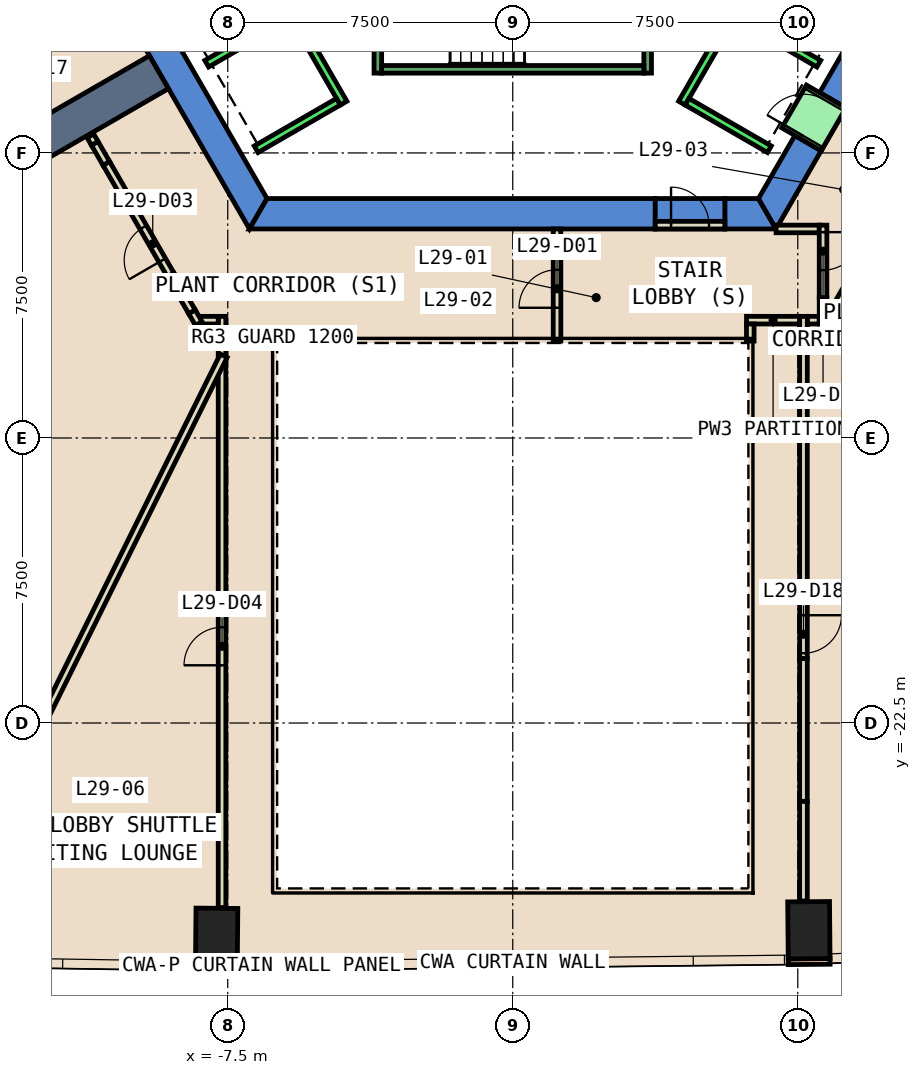
"""IFC4 building model, lengths in metres.
Left out: names, types, materials, properties, quantities, classifications, styles, units other than length and angle.
Written with IfcOpenShell. Run it as: python <this file> out.ifc"""

import sys

from ifc_helpers import new_model, si_unit, direction, frame, frame_2d, origin, origin_2d, place, context, subcontext, project, spatial, polyline, rectangle, outline, extrude, element, fill, save


model = new_model("IFC4")
c1 = context("Model", 3, precision=1e-05, world=origin(), true_north=direction((0.0, 1.0)))
c2 = subcontext(c1, "Body", "Model", "MODEL_VIEW")
j1 = project(units=[si_unit("LENGTHUNIT", "METRE"), si_unit("PLANEANGLEUNIT", "RADIAN")], contexts=[c1])
p1 = place(None, origin())
s1 = spatial("IfcSite", under=j1, at=p1, CompositionType="ELEMENT")
p2 = place(p1, origin())
s2 = spatial("IfcBuilding", under=s1, at=p2, CompositionType="ELEMENT")
p3 = place(p2, frame((0.0, 0.0, 132.8)))
s3 = spatial("IfcBuildingStorey", under=s2, at=p3, CompositionType="ELEMENT", Elevation=132.8)
for number, where, z_axis, x_axis in (
    (1, (-7.792, -28.125, -0.6), (0.0, 0.0, 1.0), (-1.0, 0.009, 0.0)),
    (2, (7.792, -27.952, -0.6), (0.0, 0.0, 1.0), (1.0, 0.009, 0.0)),
):
    element("IfcColumn", number, at=place(p3, frame(where, z_axis=z_axis, x_axis=x_axis)), inside=s3, PredefinedType="COLUMN", context=c2, shape_type="SweptSolid", body=[
        extrude(rectangle(XDim=1.1, YDim=1.5, at=origin_2d()), origin(), (0.0, 0.0, 1.0), 5.4),
    ])
p4 = place(p3, frame((0.0, 0.0, -0.6)))
e3 = element("IfcWall", 3, at=p4, inside=s3, PredefinedType="SHEAR", context=c2, shape_type="SweptSolid", body=[
    extrude(outline(polyline([(-13.856, 2.5), (-6.928, -9.5), (-6.466, -8.7), (-12.933, 2.5), (-13.856, 2.5)])), origin(), (0.0, 0.0, 1.0), 5.4),
])
p5 = place(p3, frame((0.0, 0.0, -0.6)))
e4 = element("IfcWall", 4, at=p5, inside=s3, PredefinedType="SHEAR", context=c2, shape_type="SweptSolid", body=[
    extrude(outline(polyline([(3.75, -9.5), (3.75, -8.7), (-6.466, -8.7), (-6.928, -9.5), (3.75, -9.5)])), origin(), (0.0, 0.0, 1.0), 5.4),
])
p6 = place(p3, frame((0.0, 0.0, -0.6)))
e5 = element("IfcWall", 5, at=p6, inside=s3, PredefinedType="SHEAR", context=c2, shape_type="SweptSolid", body=[
    extrude(outline(polyline([(5.58, -8.7), (5.58, -9.5), (6.928, -9.5), (6.466, -8.7), (5.58, -8.7)])), origin(), (0.0, 0.0, 1.0), 5.4),
])
p7 = place(p3, frame((0.0, 0.0, 3.6)))
e6 = element("IfcWall", 6, at=p7, inside=s3, PredefinedType="SHEAR", context=c2, shape_type="SweptSolid", body=[
    extrude(outline(polyline([(5.58, -9.5), (5.58, -8.7), (3.75, -8.7), (3.75, -9.5), (5.58, -9.5)])), origin(), (0.0, 0.0, 1.0), 1.2),
])
p8 = place(p3, frame((0.0, 0.0, -0.6)))
e7 = element("IfcWall", 7, at=p8, inside=s3, PredefinedType="SHEAR", context=c2, shape_type="SweptSolid", body=[
    extrude(outline(polyline([(8.117, -7.44), (7.424, -7.04), (6.466, -8.7), (6.928, -9.5), (8.117, -7.44)])), origin(), (0.0, 0.0, 1.0), 5.4),
])
p9 = place(p3, frame((0.0, 0.0, -0.6)))
e8 = element("IfcWall", 8, at=p9, inside=s3, PredefinedType="SHEAR", context=c2, shape_type="SweptSolid", body=[
    extrude(outline(polyline([(9.417, -5.189), (8.724, -4.789), (8.075, -5.914), (8.767, -6.314), (9.417, -5.189)])), origin(), (0.0, 0.0, 1.0), 5.4),
])
p10 = place(p3, frame((0.0, 0.0, 3.6)))
e9 = element("IfcWall", 9, at=p10, inside=s3, PredefinedType="SHEAR", context=c2, shape_type="SweptSolid", body=[
    extrude(outline(polyline([(8.767, -6.314), (8.075, -5.914), (7.424, -7.04), (8.117, -7.44), (8.767, -6.314)])), origin(), (0.0, 0.0, 1.0), 1.2),
])
p11 = place(p3, frame((-9.31, -5.375, 0.0), z_axis=(0.0, 0.0, 1.0), x_axis=(-0.86602173752, -0.500006350103, 0.0)))
e10 = element("IfcWall", 10, at=p11, inside=s3, PredefinedType="SHEAR", context=c2, shape_type="SweptSolid", body=[
    extrude(rectangle(XDim=31.463, YDim=1.0, at=frame_2d((15.732, 0.0))), origin(), (0.0, 0.0, 1.0), 4.8),
])
for number, where, z_axis, x_axis in (
    (11, (-8.349, -28.945, 0.0), (0.0, 0.0, 1.0), (1.0, -0.009, 0.0)),
    (12, (7.249, -28.782, 0.0), (0.0, 0.0, 1.0), (1.0, 0.009, 0.0)),
):
    element("IfcWall", number, at=place(p3, frame(where, z_axis=z_axis, x_axis=x_axis)), inside=s3, PredefinedType="STANDARD", context=c2, shape_type="SweptSolid", body=[
        extrude(rectangle(XDim=1.1, YDim=0.15, at=frame_2d((0.55, 0.0))), origin(), (0.0, 0.0, 1.0), 4.8),
    ])
p12 = place(p3, frame((1.165, -12.45, 0.0), z_axis=(0.0, 0.0, 1.0), x_axis=(0.0, 1.0, 0.0)))
e13 = element("IfcWall", 13, at=p12, inside=s3, PredefinedType="PARTITIONING", context=c2, shape_type="SweptSolid", body=[
    extrude(rectangle(XDim=2.95, YDim=0.2, at=frame_2d((1.475, 0.0))), origin(), (0.0, 0.0, 1.0), 4.8),
])
p13 = place(p12, frame((0.876, 0.0, 0.0)))
e14 = element("IfcOpeningElement", 14, at=p13, cuts=e13, PredefinedType="OPENING", context=c2, shape_type="SweptSolid", body=[
    extrude(rectangle(XDim=1.0, YDim=2.1, at=frame_2d((0.5, 1.05))), frame((0.0, 0.11, 0.0), z_axis=(0.0, -1.0, 0.0), x_axis=(1.0, 0.0, 0.0)), (0.0, 0.0, 1.0), 0.22),
])
p14 = place(p3, frame((7.55, -11.9, 0.0), z_axis=(0.0, 0.0, 1.0), x_axis=(-1.0, 0.0, 0.0)))
e15 = element("IfcWall", 15, at=p14, inside=s3, PredefinedType="PARTITIONING", context=c2, shape_type="SweptSolid", body=[
    extrude(rectangle(XDim=1.399, YDim=0.2, at=frame_2d((0.7, 0.0))), origin(), (0.0, 0.0, 1.0), 4.8),
])
p15 = place(p3, frame((6.25, -12.0, 0.0), z_axis=(0.0, 0.0, 1.0), x_axis=(0.0, -1.0, 0.0)))
e16 = element("IfcWall", 16, at=p15, inside=s3, PredefinedType="PARTITIONING", context=c2, shape_type="SweptSolid", body=[
    extrude(rectangle(XDim=0.45, YDim=0.2, at=frame_2d((0.225, 0.0))), origin(), (0.0, 0.0, 1.0), 4.8),
])
p16 = place(p3, frame((6.928, -9.5, 0.0), z_axis=(0.0, 0.0, 1.0), x_axis=(1.0, 0.0, 0.0)))
e17 = element("IfcWall", 17, at=p16, inside=s3, PredefinedType="PARTITIONING", context=c2, shape_type="SweptSolid", body=[
    extrude(rectangle(XDim=1.137, YDim=0.2, at=frame_2d((0.568, 0.0))), origin(), (0.0, 0.0, 1.0), 2.4),
])
p17 = place(p3, frame((8.165, -9.4, 0.0), z_axis=(0.0, 0.0, 1.0), x_axis=(0.0, -1.0, 0.0)))
e18 = element("IfcWall", 18, at=p17, inside=s3, PredefinedType="PARTITIONING", context=c2, shape_type="SweptSolid", body=[
    extrude(rectangle(XDim=1.914, YDim=0.2, at=frame_2d((0.957, 0.0))), origin(), (0.0, 0.0, 1.0), 2.4),
])
p18 = place(p17, frame((0.184, 0.0, 0.0)))
e19 = element("IfcOpeningElement", 19, at=p18, cuts=e18, PredefinedType="OPENING", context=c2, shape_type="SweptSolid", body=[
    extrude(rectangle(XDim=1.0, YDim=2.1, at=frame_2d((0.5, 1.05))), frame((0.0, 0.11, 0.0), z_axis=(0.0, -1.0, 0.0), x_axis=(1.0, 0.0, 0.0)), (0.0, 0.0, 1.0), 0.22),
])
p19 = place(p3, frame((8.065, -11.9, 0.0), z_axis=(0.0, 0.0, 1.0), x_axis=(-1.0, 0.0, 0.0)))
e20 = element("IfcWall", 20, at=p19, inside=s3, PredefinedType="PARTITIONING", context=c2, shape_type="SweptSolid", body=[
    extrude(rectangle(XDim=0.315, YDim=0.2, at=frame_2d((0.157, 0.0))), origin(), (0.0, 0.0, 1.0), 4.8),
])
p20 = place(p3, frame((7.65, -11.8, 0.0), z_axis=(0.0, 0.0, 1.0), x_axis=(0.0, -1.0, 0.0)))
e21 = element("IfcWall", 21, at=p20, inside=s3, PredefinedType="PARTITIONING", context=c2, shape_type="SweptSolid", body=[
    extrude(rectangle(XDim=9.006, YDim=0.2, at=frame_2d((4.503, 0.0))), origin(), (0.0, 0.0, 1.0), 4.8),
])
p21 = place(p20, frame((7.864, 0.0, 0.0)))
e22 = element("IfcOpeningElement", 22, at=p21, cuts=e21, PredefinedType="OPENING", context=c2, shape_type="SweptSolid", body=[
    extrude(rectangle(XDim=1.0, YDim=2.1, at=frame_2d((0.5, 1.05))), frame((0.0, 0.11, 0.0), z_axis=(0.0, -1.0, 0.0), x_axis=(1.0, 0.0, 0.0)), (0.0, 0.0, 1.0), 0.22),
])
p22 = place(p3, frame((-7.65, -12.826, 0.0), z_axis=(0.0, 0.0, 1.0), x_axis=(0.0, 1.0, 0.0)))
e23 = element("IfcWall", 23, at=p22, inside=s3, PredefinedType="PARTITIONING", context=c2, shape_type="SweptSolid", body=[
    extrude(rectangle(XDim=1.026, YDim=0.2, at=frame_2d((0.513, 0.0))), origin(), (0.0, 0.0, 1.0), 4.8),
])
p23 = place(p3, frame((-7.75, -11.9, 0.0), z_axis=(0.0, 0.0, 1.0), x_axis=(-1.0, 0.0, 0.0)))
e24 = element("IfcWall", 24, at=p23, inside=s3, PredefinedType="PARTITIONING", context=c2, shape_type="SweptSolid", body=[
    extrude(rectangle(XDim=0.464, YDim=0.2, at=frame_2d((0.232, 0.0))), origin(), (0.0, 0.0, 1.0), 4.8),
])
p24 = place(p3, frame((-8.264, -11.987, 0.0), z_axis=(0.0, 0.0, 1.0), x_axis=(-0.499011179969, 0.866595547107, 0.0)))
e25 = element("IfcWall", 25, at=p24, inside=s3, PredefinedType="PARTITIONING", context=c2, shape_type="SweptSolid", body=[
    extrude(rectangle(XDim=0.357, YDim=0.2, at=frame_2d((0.178, 0.0))), origin(), (0.0, 0.0, 1.0), 4.8),
])
p25 = place(p3, frame((-7.65, -27.356, 0.0), z_axis=(0.0, 0.0, 1.0), x_axis=(0.0, 1.0, 0.0)))
e26 = element("IfcWall", 26, at=p25, inside=s3, PredefinedType="PARTITIONING", context=c2, shape_type="SweptSolid", body=[
    extrude(rectangle(XDim=14.33, YDim=0.2, at=frame_2d((7.165, 0.0))), origin(), (0.0, 0.0, 1.0), 4.8),
])
p26 = place(p25, frame((6.375, 0.0, 0.0)))
e27 = element("IfcOpeningElement", 27, at=p26, cuts=e26, PredefinedType="OPENING", context=c2, shape_type="SweptSolid", body=[
    extrude(rectangle(XDim=1.0, YDim=2.1, at=frame_2d((0.5, 1.05))), frame((0.0, 0.11, 0.0), z_axis=(0.0, -1.0, 0.0), x_axis=(1.0, 0.0, 0.0)), (0.0, 0.0, 1.0), 0.22),
])
p27 = place(p3, frame((-7.606, -12.836, 0.0), z_axis=(0.0, 0.0, 1.0), x_axis=(-0.444253710324, -0.895901021801, 0.0)))
e28 = element("IfcWall", 28, at=p27, inside=s3, PredefinedType="PARTITIONING", context=c2, shape_type="SweptSolid", body=[
    extrude(rectangle(XDim=16.081, YDim=0.2, at=frame_2d((8.041, 0.0))), origin(), (0.0, 0.0, 1.0), 4.8),
])
p28 = place(p3, frame((-39.358, -20.223, 0.0), z_axis=(0.0, 0.0, 1.0), x_axis=(0.866032184561, 0.499988255166, 0.0)))
e29 = element("IfcWall", 29, at=p28, inside=s3, PredefinedType="PARTITIONING", context=c2, shape_type="SweptSolid", body=[
    extrude(rectangle(XDim=33.447, YDim=0.2, at=frame_2d((16.723, 0.0))), origin(), (0.0, 0.0, 1.0), 4.8),
])
p29 = place(p3, frame((3.75, -9.4, 0.0), z_axis=(0.0, 0.0, 1.0), x_axis=(1.0, 0.0, 0.0)))
e30 = element("IfcWall", 30, at=p29, inside=s3, PredefinedType="PARTITIONING", context=c2, shape_type="SweptSolid", body=[
    extrude(rectangle(XDim=1.83, YDim=0.2, at=frame_2d((0.915, 0.0))), origin(), (0.0, 0.0, 1.0), 2.4),
])
p30 = place(p29, frame((0.415, 0.0, 0.0)))
e31 = element("IfcOpeningElement", 31, at=p30, cuts=e30, PredefinedType="OPENING", context=c2, shape_type="SweptSolid", body=[
    extrude(rectangle(XDim=1.0, YDim=2.1, at=frame_2d((0.5, 1.05))), frame((0.0, 0.11, 0.0), z_axis=(0.0, -1.0, 0.0), x_axis=(1.0, 0.0, 0.0)), (0.0, 0.0, 1.0), 0.22),
])
p31 = place(p3, frame((8.165, -11.314, 0.0), z_axis=(0.0, 0.0, 1.0), x_axis=(0.0, -1.0, 0.0)))
e32 = element("IfcWall", 32, at=p31, inside=s3, PredefinedType="PARTITIONING", context=c2, shape_type="SweptSolid", body=[
    extrude(rectangle(XDim=0.686, YDim=0.2, at=frame_2d((0.343, 0.0))), origin(), (0.0, 0.0, 1.0), 4.8),
])
p32 = place(p3, frame((7.65, -20.806, 0.0), z_axis=(0.0, 0.0, 1.0), x_axis=(0.0, -1.0, 0.0)))
e33 = element("IfcWall", 33, at=p32, inside=s3, PredefinedType="PARTITIONING", context=c2, shape_type="SweptSolid", body=[
    extrude(rectangle(XDim=3.755, YDim=0.2, at=frame_2d((1.877, 0.0))), origin(), (0.0, 0.0, 1.0), 2.4),
])
p33 = place(p3, frame((7.65, -24.561, 0.0), z_axis=(0.0, 0.0, 1.0), x_axis=(0.0, -1.0, 0.0)))
e34 = element("IfcWall", 34, at=p33, inside=s3, PredefinedType="PARTITIONING", context=c2, shape_type="SweptSolid", body=[
    extrude(rectangle(XDim=2.622, YDim=0.2, at=frame_2d((1.311, 0.0))), origin(), (0.0, 0.0, 1.0), 4.8),
])
p34 = place(p3, frame((-8.442, -11.678, 0.0), z_axis=(0.0, 0.0, 1.0), x_axis=(-0.500408426468, 0.865789470206, 0.0)))
e35 = element("IfcWall", 35, at=p34, inside=s3, PredefinedType="PARTITIONING", context=c2, shape_type="SweptSolid", body=[
    extrude(rectangle(XDim=1.119, YDim=0.2, at=frame_2d((0.56, 0.0))), origin(), (0.0, 0.0, 1.0), 2.4),
])
p35 = place(p3, frame((-9.002, -10.709, 0.0), z_axis=(0.0, 0.0, 1.0), x_axis=(-0.499654870059, 0.866224572975, 0.0)))
e36 = element("IfcWall", 36, at=p35, inside=s3, PredefinedType="PARTITIONING", context=c2, shape_type="SweptSolid", body=[
    extrude(rectangle(XDim=2.398, YDim=0.2, at=frame_2d((1.199, 0.0))), origin(), (0.0, 0.0, 1.0), 4.8),
])
p36 = place(p35, frame((0.444, 0.0, 0.0)))
e37 = element("IfcOpeningElement", 37, at=p36, cuts=e36, PredefinedType="OPENING", context=c2, shape_type="SweptSolid", body=[
    extrude(rectangle(XDim=1.0, YDim=2.1, at=frame_2d((0.5, 1.05))), frame((0.0, 0.11, 0.0), z_axis=(0.0, -1.0, 0.0), x_axis=(1.0, 0.0, 0.0)), (0.0, 0.0, 1.0), 0.22),
])
p37 = place(p3, frame((-10.2, -8.632, 0.0), z_axis=(0.0, 0.0, 1.0), x_axis=(-0.500482758314, 0.865746503678, 0.0)))
e38 = element("IfcWall", 38, at=p37, inside=s3, PredefinedType="PARTITIONING", context=c2, shape_type="SweptSolid", body=[
    extrude(rectangle(XDim=0.991, YDim=0.2, at=frame_2d((0.496, 0.0))), origin(), (0.0, 0.0, 1.0), 2.3),
])
p38 = place(p3, frame((-10.696, -7.774, 0.0), z_axis=(0.0, 0.0, 1.0), x_axis=(-0.49972245349, 0.866185586049, 0.0)))
e39 = element("IfcWall", 39, at=p38, inside=s3, PredefinedType="PARTITIONING", context=c2, shape_type="SweptSolid", body=[
    extrude(rectangle(XDim=0.608, YDim=0.2, at=frame_2d((0.304, 0.0))), origin(), (0.0, 0.0, 1.0), 4.8),
])
p39 = place(p3, frame((-11.0, -7.247, 0.0), z_axis=(0.0, 0.0, 1.0), x_axis=(-0.499504513693, 0.866311284008, 0.0)))
e40 = element("IfcWall", 40, at=p39, inside=s3, PredefinedType="PARTITIONING", context=c2, shape_type="SweptSolid", body=[
    extrude(rectangle(XDim=0.226, YDim=0.2, at=frame_2d((0.113, 0.0))), origin(), (0.0, 0.0, 1.0), 2.1),
])
p40 = place(p3, frame((9.001, -10.709, 0.0), z_axis=(0.0, 0.0, 1.0), x_axis=(-0.499753940741, -0.866167419564, 0.0)))
e41 = element("IfcWall", 41, at=p40, inside=s3, PredefinedType="PARTITIONING", context=c2, shape_type="SweptSolid", body=[
    extrude(rectangle(XDim=1.119, YDim=0.2, at=frame_2d((0.559, 0.0))), origin(), (0.0, 0.0, 1.0), 2.4),
])
p41 = place(p3, frame((8.442, -11.678, 0.0), z_axis=(0.0, 0.0, 1.0), x_axis=(-0.499011179969, -0.866595547107, 0.0)))
e42 = element("IfcWall", 42, at=p41, inside=s3, PredefinedType="PARTITIONING", context=c2, shape_type="SweptSolid", body=[
    extrude(rectangle(XDim=0.357, YDim=0.2, at=frame_2d((0.178, 0.0))), origin(), (0.0, 0.0, 1.0), 4.8),
])
p42 = place(p3, frame((-9.751, 2.99, 0.0), z_axis=(0.0, 0.0, 1.0), x_axis=(0.50000090737, -0.866024879913, 0.0)))
e43 = element("IfcWall", 43, at=p42, inside=s3, PredefinedType="STANDARD", context=c2, shape_type="SweptSolid", body=[
    extrude(rectangle(XDim=10.6, YDim=0.2, at=frame_2d((5.3, 0.0))), origin(), (0.0, 0.0, 1.0), 4.8),
])
for number, where, z_axis, x_axis in (
    (44, (-5.888, -3.902, 0.0), (0.0, 0.0, 1.0), (-0.866, -0.5, 0.0)),
    (45, (-4.588, -6.153, 0.0), (0.0, 0.0, 1.0), (-0.866, -0.5, 0.0)),
):
    element("IfcWall", number, at=place(p3, frame(where, z_axis=z_axis, x_axis=x_axis)), inside=s3, PredefinedType="STANDARD", context=c2, shape_type="SweptSolid", body=[
        extrude(rectangle(XDim=2.5, YDim=0.2, at=frame_2d((1.25, 0.0))), origin(), (0.0, 0.0, 1.0), 4.8),
    ])
p43 = place(p3, frame((4.451, -6.19, 0.0), z_axis=(0.0, 0.0, 1.0), x_axis=(0.50000090737, 0.866024879913, 0.0)))
e46 = element("IfcWall", 46, at=p43, inside=s3, PredefinedType="STANDARD", context=c2, shape_type="SweptSolid", body=[
    extrude(rectangle(XDim=10.6, YDim=0.2, at=frame_2d((5.3, 0.0))), origin(), (0.0, 0.0, 1.0), 4.8),
])
for number, where, z_axis, x_axis in (
    (47, (4.588, -6.153, 0.0), (0.0, 0.0, 1.0), (0.866, -0.5, 0.0)),
    (48, (5.888, -3.902, 0.0), (0.0, 0.0, 1.0), (0.866, -0.5, 0.0)),
):
    element("IfcWall", number, at=place(p3, frame(where, z_axis=z_axis, x_axis=x_axis)), inside=s3, PredefinedType="STANDARD", context=c2, shape_type="SweptSolid", body=[
        extrude(rectangle(XDim=2.5, YDim=0.2, at=frame_2d((1.25, 0.0))), origin(), (0.0, 0.0, 1.0), 4.8),
    ])
p44 = place(p3, frame((7.598, -7.14, 0.0), z_axis=(0.0, 0.0, 1.0), x_axis=(0.500362116554, 0.865816234728, 0.0)))
e49 = element("IfcWall", 49, at=p44, inside=s3, PredefinedType="STANDARD", context=c2, shape_type="SweptSolid", body=[
    extrude(rectangle(XDim=1.299, YDim=1.2, at=frame_2d((0.65, 0.0))), origin(), (0.0, 0.0, 1.0), 2.4),
])
p45 = place(p44, frame((0.1, 0.0, 0.0)))
e50 = element("IfcOpeningElement", 50, at=p45, cuts=e49, PredefinedType="OPENING", context=c2, shape_type="SweptSolid", body=[
    extrude(rectangle(XDim=1.1, YDim=2.3, at=frame_2d((0.55, 1.15))), frame((0.0, 0.61, 0.0), z_axis=(0.0, -1.0, 0.0), x_axis=(1.0, 0.0, 0.0)), (0.0, 0.0, 1.0), 1.22),
])
p46 = place(p3, frame((8.898, -4.889, 0.0), z_axis=(0.0, 0.0, 1.0), x_axis=(0.500036693733, 0.866004217611, 0.0)))
e51 = element("IfcWall", 51, at=p46, inside=s3, PredefinedType="STANDARD", context=c2, shape_type="SweptSolid", body=[
    extrude(rectangle(XDim=1.3, YDim=1.2, at=frame_2d((0.65, 0.0))), origin(), (0.0, 0.0, 1.0), 2.4),
])
p47 = place(p46, frame((0.1, 0.0, 0.0)))
e52 = element("IfcOpeningElement", 52, at=p47, cuts=e51, PredefinedType="OPENING", context=c2, shape_type="SweptSolid", body=[
    extrude(rectangle(XDim=1.1, YDim=2.3, at=frame_2d((0.55, 1.15))), frame((0.0, 0.61, 0.0), z_axis=(0.0, -1.0, 0.0), x_axis=(1.0, 0.0, 0.0)), (0.0, 0.0, 1.0), 1.22),
])
p48 = place(p3, frame((-3.55, -1.0, 0.0), z_axis=(0.0, 0.0, 1.0), x_axis=(0.0, -1.0, 0.0)))
e53 = element("IfcWall", 53, at=p48, inside=s3, PredefinedType="STANDARD", context=c2, shape_type="SweptSolid", body=[
    extrude(rectangle(XDim=4.4, YDim=0.2, at=frame_2d((2.2, 0.0))), origin(), (0.0, 0.0, 1.0), 4.8),
])
p49 = place(p48, frame((1.65, 0.0, 0.0)))
e54 = element("IfcOpeningElement", 54, at=p49, cuts=e53, PredefinedType="OPENING", context=c2, shape_type="SweptSolid", body=[
    extrude(rectangle(XDim=1.1, YDim=2.2, at=frame_2d((0.55, 1.1))), frame((0.0, 0.11, 0.0), z_axis=(0.0, -1.0, 0.0), x_axis=(1.0, 0.0, 0.0)), (0.0, 0.0, 1.0), 0.22),
])
p50 = place(p3, frame((3.55, -2.667, 0.0), z_axis=(0.0, 0.0, 1.0), x_axis=(0.0, -1.0, 0.0)))
e55 = element("IfcWall", 55, at=p50, inside=s3, PredefinedType="STANDARD", context=c2, shape_type="SweptSolid", body=[
    extrude(rectangle(XDim=2.733, YDim=0.2, at=frame_2d((1.366, 0.0))), origin(), (0.0, 0.0, 1.0), 4.8),
])
p51 = place(p3, frame((-3.45, -5.3, 0.0), z_axis=(0.0, 0.0, 1.0), x_axis=(1.0, 0.0, 0.0)))
e56 = element("IfcWall", 56, at=p51, inside=s3, PredefinedType="STANDARD", context=c2, shape_type="SweptSolid", body=[
    extrude(rectangle(XDim=6.9, YDim=0.2, at=frame_2d((3.45, 0.0))), origin(), (0.0, 0.0, 1.0), 4.8),
])
p52 = place(p13, origin())
e57 = element("IfcDoor", 57, at=p52, inside=s3, OperationType="SINGLE_SWING_LEFT", PredefinedType="DOOR", context=c2, shape_type="SweptSolid", body=[
    extrude(rectangle(XDim=1.0, YDim=2.1, at=frame_2d((0.5, 1.05))), frame((0.0, 0.025, 0.0), z_axis=(0.0, -1.0, 0.0), x_axis=(1.0, 0.0, 0.0)), (0.0, 0.0, 1.0), 0.05),
])
fill(e14, e57)
p53 = place(p18, origin())
e58 = element("IfcDoor", 58, at=p53, inside=s3, OperationType="SINGLE_SWING_RIGHT", PredefinedType="DOOR", context=c2, shape_type="SweptSolid", body=[
    extrude(rectangle(XDim=1.0, YDim=2.1, at=frame_2d((0.5, 1.05))), frame((0.0, 0.025, 0.0), z_axis=(0.0, -1.0, 0.0), x_axis=(1.0, 0.0, 0.0)), (0.0, 0.0, 1.0), 0.05),
])
fill(e19, e58)
p54 = place(p36, origin())
e59 = element("IfcDoor", 59, at=p54, inside=s3, OperationType="SINGLE_SWING_LEFT", PredefinedType="DOOR", context=c2, shape_type="SweptSolid", body=[
    extrude(rectangle(XDim=1.0, YDim=2.1, at=frame_2d((0.5, 1.05))), frame((0.0, 0.025, 0.0), z_axis=(0.0, -1.0, 0.0), x_axis=(1.0, 0.0, 0.0)), (0.0, 0.0, 1.0), 0.05),
])
fill(e37, e59)
p55 = place(p26, origin())
e60 = element("IfcDoor", 60, at=p55, inside=s3, OperationType="SINGLE_SWING_RIGHT", PredefinedType="DOOR", context=c2, shape_type="SweptSolid", body=[
    extrude(rectangle(XDim=1.0, YDim=2.1, at=frame_2d((0.5, 1.05))), frame((0.0, 0.025, 0.0), z_axis=(0.0, -1.0, 0.0), x_axis=(1.0, 0.0, 0.0)), (0.0, 0.0, 1.0), 0.05),
])
fill(e27, e60)
p56 = place(p21, origin())
e61 = element("IfcDoor", 61, at=p56, inside=s3, OperationType="SINGLE_SWING_RIGHT", PredefinedType="DOOR", context=c2, shape_type="SweptSolid", body=[
    extrude(rectangle(XDim=1.0, YDim=2.1, at=frame_2d((0.5, 1.05))), frame((0.0, 0.025, 0.0), z_axis=(0.0, -1.0, 0.0), x_axis=(1.0, 0.0, 0.0)), (0.0, 0.0, 1.0), 0.05),
])
fill(e22, e61)
p57 = place(p30, origin())
e62 = element("IfcDoor", 62, at=p57, inside=s3, OperationType="SINGLE_SWING_LEFT", PredefinedType="DOOR", context=c2, shape_type="SweptSolid", body=[
    extrude(rectangle(XDim=1.0, YDim=2.1, at=frame_2d((0.5, 1.05))), frame((0.0, 0.025, 0.0), z_axis=(0.0, -1.0, 0.0), x_axis=(1.0, 0.0, 0.0)), (0.0, 0.0, 1.0), 0.05),
])
fill(e31, e62)
p58 = place(p45, origin())
e63 = element("IfcDoor", 63, at=p58, inside=s3, OperationType="SLIDING_TO_LEFT", PredefinedType="DOOR", context=c2, shape_type="SweptSolid", body=[
    extrude(rectangle(XDim=1.1, YDim=2.3, at=frame_2d((0.55, 1.15))), frame((0.0, 0.025, 0.0), z_axis=(0.0, -1.0, 0.0), x_axis=(1.0, 0.0, 0.0)), (0.0, 0.0, 1.0), 0.05),
])
fill(e50, e63)
save(model, sys.argv[1])
